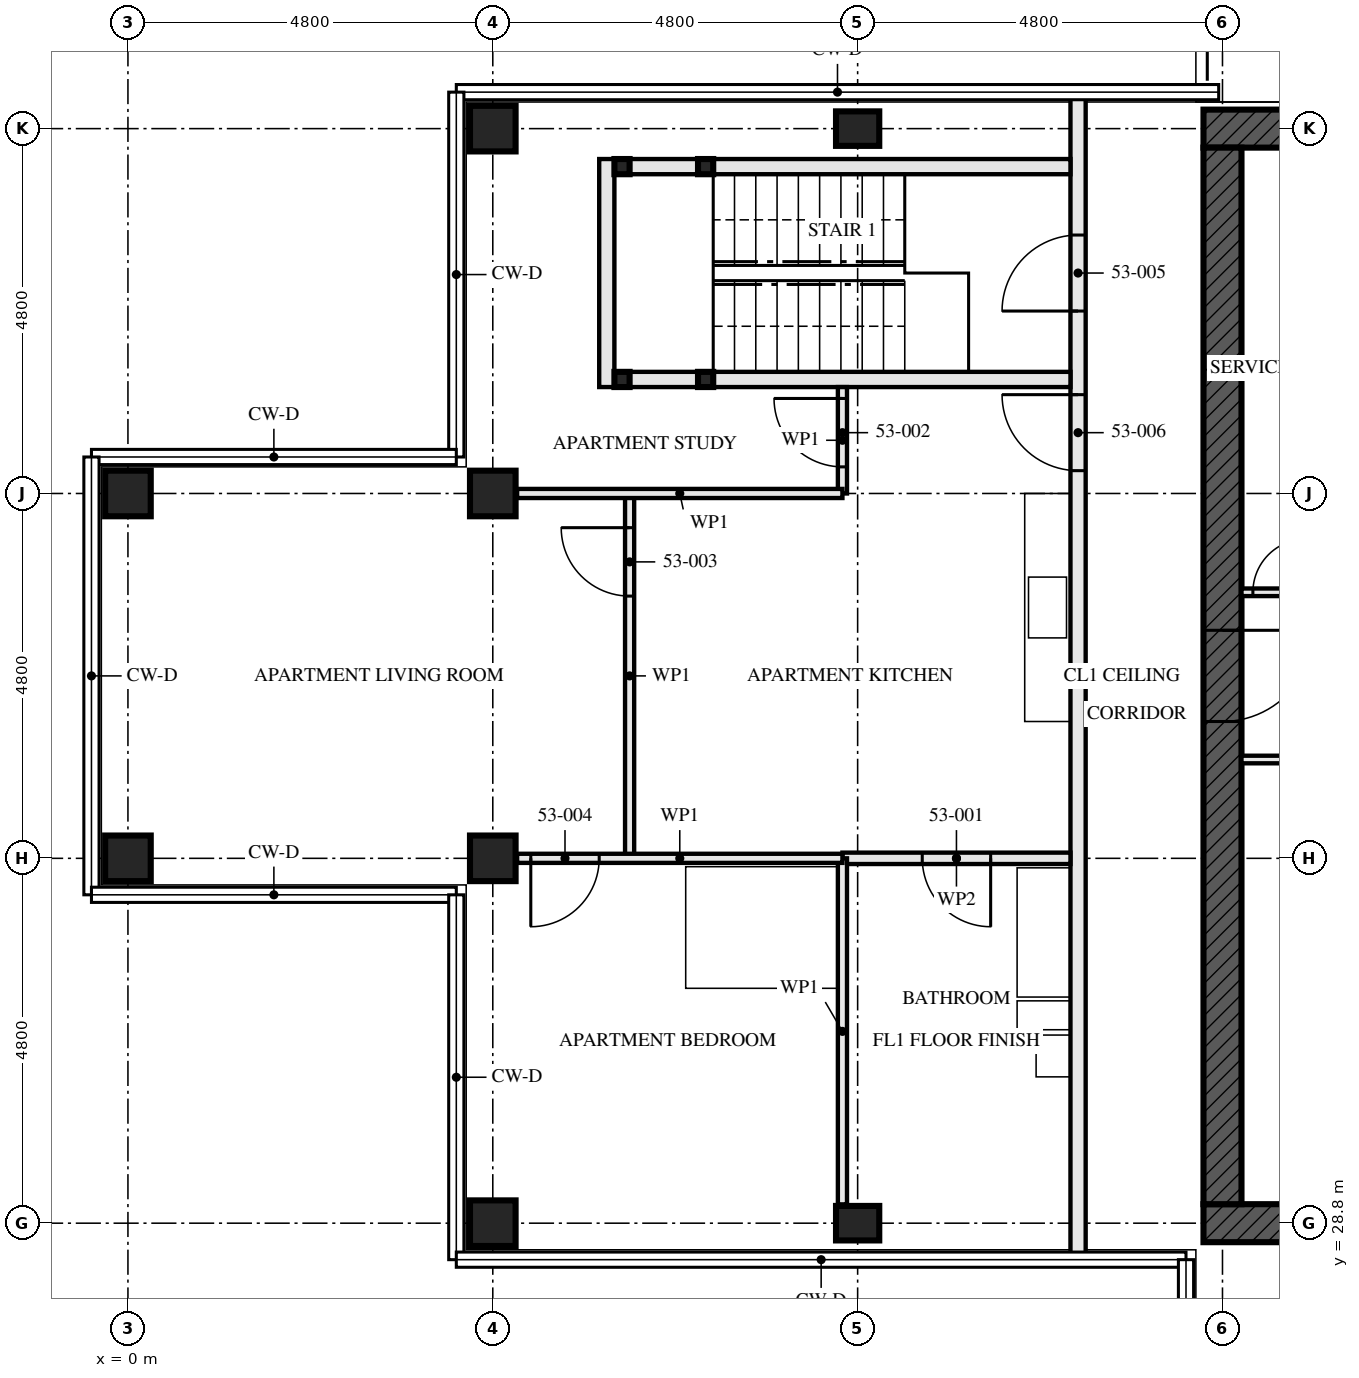
"""IFC4 building model, lengths in metres.
Left out: names, types, materials, properties, quantities, classifications, styles, units other than length and angle.
Written with IfcOpenShell. Run it as: python <this file> out.ifc"""

import sys

from ifc_helpers import new_model, si_unit, direction, frame, frame_2d, origin, origin_2d, place, context, subcontext, project, spatial, rectangle, hollow_rectangle, i_section, extrude, element, fill, save


model = new_model("IFC4")
c1 = context("Model", 3, precision=1e-05, world=origin(), true_north=direction((0.0, 1.0)))
c2 = subcontext(c1, "Body", "Model", "MODEL_VIEW")
j1 = project(units=[si_unit("LENGTHUNIT", "METRE"), si_unit("PLANEANGLEUNIT", "RADIAN")], contexts=[c1])
p1 = place(None, origin())
s1 = spatial("IfcSite", under=j1, at=p1, CompositionType="ELEMENT")
p2 = place(p1, origin())
s2 = spatial("IfcBuilding", under=s1, at=p2, CompositionType="ELEMENT")
p3 = place(p2, frame((0.0, 0.0, 194.5)))
s3 = spatial("IfcBuildingStorey", under=s2, at=p3, CompositionType="ELEMENT", Elevation=194.5)
for number, where, z_axis, x_axis in (
    (1, (0.0, 33.6, 0.0), (0.0, 0.0, 1.0), (0.0, 1.0, 0.0)),
    (2, (0.0, 38.4, 0.0), (0.0, 0.0, 1.0), (0.0, 1.0, 0.0)),
    (3, (4.8, 28.8, 0.0), (0.0, 0.0, 1.0), (0.0, 1.0, 0.0)),
    (4, (4.8, 33.6, 0.0), (0.0, 0.0, 1.0), (0.0, 1.0, 0.0)),
    (5, (4.8, 38.4, 0.0), (0.0, 0.0, 1.0), (0.0, 1.0, 0.0)),
    (6, (4.8, 43.2, 0.0), (0.0, 0.0, 1.0), (0.0, 1.0, 0.0)),
):
    element("IfcColumn", number, at=place(p3, frame(where, z_axis=z_axis, x_axis=x_axis)), inside=s3, PredefinedType="COLUMN", context=c2, shape_type="SweptSolid", body=[
        extrude(hollow_rectangle(XDim=0.6, YDim=0.6, WallThickness=0.05, at=origin_2d()), origin(), (0.0, 0.0, 1.0), 3.5),
    ])
for number, where, z_axis, x_axis in (
    (7, (9.6, 28.8, 0.0), (0.0, 0.0, 1.0), (0.0, 1.0, 0.0)),
    (8, (9.6, 43.2, 0.0), (0.0, 0.0, 1.0), (0.0, 1.0, 0.0)),
):
    element("IfcColumn", number, at=place(p3, frame(where, z_axis=z_axis, x_axis=x_axis)), inside=s3, PredefinedType="COLUMN", context=c2, shape_type="SweptSolid", body=[
        extrude(i_section(OverallWidth=0.454, OverallDepth=0.569, WebThickness=0.078, FlangeThickness=0.125, FilletRadius=0.015, at=origin_2d()), origin(), (0.0, 0.0, 1.0), 3.5),
    ])
p4 = place(p3, frame((14.15, 28.8, -0.17), z_axis=(0.0, 0.0, 1.0), x_axis=(1.0, 0.0, 0.0)))
e9 = element("IfcWall", 9, at=p4, inside=s3, PredefinedType="SHEAR", context=c2, shape_type="SweptSolid", body=[
    extrude(rectangle(XDim=14.9, YDim=0.5, at=frame_2d((7.45, 0.0))), origin(), (0.0, 0.0, 1.0), 3.5),
])
p5 = place(p4, frame((6.85, 0.0, 0.17)))
e10 = element("IfcOpeningElement", 10, at=p5, cuts=e9, PredefinedType="OPENING", context=c2, shape_type="SweptSolid", body=[
    extrude(rectangle(XDim=1.2, YDim=2.1, at=frame_2d((0.6, 1.05))), frame((0.0, 0.26, 0.0), z_axis=(0.0, -1.0, 0.0), x_axis=(1.0, 0.0, 0.0)), (0.0, 0.0, 1.0), 0.521),
])
p6 = place(p3, frame((29.05, 43.2, -0.17), z_axis=(0.0, 0.0, 1.0), x_axis=(-1.0, 0.0, 0.0)))
e11 = element("IfcWall", 11, at=p6, inside=s3, PredefinedType="SHEAR", context=c2, shape_type="SweptSolid", body=[
    extrude(rectangle(XDim=14.9, YDim=0.5, at=frame_2d((7.45, 0.0))), origin(), (0.0, 0.0, 1.0), 3.5),
])
p7 = place(p6, frame((6.95, 0.0, 0.17)))
e12 = element("IfcOpeningElement", 12, at=p7, cuts=e11, PredefinedType="OPENING", context=c2, shape_type="SweptSolid", body=[
    extrude(rectangle(XDim=1.0, YDim=2.4, at=frame_2d((0.5, 1.2))), frame((0.0, 0.26, 0.0), z_axis=(0.0, -1.0, 0.0), x_axis=(1.0, 0.0, 0.0)), (0.0, 0.0, 1.0), 0.521),
])
p8 = place(p3, frame((14.4, 42.95, -0.17), z_axis=(0.0, 0.0, 1.0), x_axis=(0.0, -1.0, 0.0)))
e13 = element("IfcWall", 13, at=p8, inside=s3, PredefinedType="SHEAR", context=c2, shape_type="SweptSolid", body=[
    extrude(rectangle(XDim=13.9, YDim=0.5, at=frame_2d((6.95, 0.0))), origin(), (0.0, 0.0, 1.0), 3.5),
])
p9 = place(p8, frame((6.35, 0.0, 0.17)))
e14 = element("IfcOpeningElement", 14, at=p9, cuts=e13, PredefinedType="OPENING", context=c2, shape_type="SweptSolid", body=[
    extrude(rectangle(XDim=1.2, YDim=2.1, at=frame_2d((0.6, 1.05))), frame((0.0, 0.26, 0.0), z_axis=(0.0, -1.0, 0.0), x_axis=(1.0, 0.0, 0.0)), (0.0, 0.0, 1.0), 0.521),
])
for number, where, z_axis, x_axis in (
    (15, (6.5, 42.7, 0.0), (0.0, 0.0, 1.0), (1.0, 0.0, 0.0)),
    (16, (6.5, 39.9, 0.0), (0.0, 0.0, 1.0), (1.0, 0.0, 0.0)),
    (17, (7.6, 42.7, 0.0), (0.0, 0.0, 1.0), (1.0, 0.0, 0.0)),
    (18, (7.6, 39.9, 0.0), (0.0, 0.0, 1.0), (1.0, 0.0, 0.0)),
):
    element("IfcColumn", number, at=place(p3, frame(where, z_axis=z_axis, x_axis=x_axis)), inside=s3, PredefinedType="COLUMN", context=c2, shape_type="SweptSolid", body=[
        extrude(hollow_rectangle(XDim=0.2, YDim=0.2, WallThickness=0.008, at=origin_2d()), origin(), (0.0, 0.0, 1.0), 3.33),
    ])
p10 = place(p3, frame((6.6, 42.7, 0.0), z_axis=(0.0, 0.0, 1.0), x_axis=(1.0, 0.0, 0.0)))
e19 = element("IfcWall", 19, at=p10, inside=s3, PredefinedType="SOLIDWALL", context=c2, shape_type="SweptSolid", body=[
    extrude(rectangle(XDim=0.9, YDim=0.2, at=frame_2d((0.45, 0.0))), origin(), (0.0, 0.0, 1.0), 2.99),
])
p11 = place(p3, frame((7.7, 42.7, 0.0), z_axis=(0.0, 0.0, 1.0), x_axis=(1.0, 0.0, 0.0)))
e20 = element("IfcWall", 20, at=p11, inside=s3, PredefinedType="SOLIDWALL", context=c2, shape_type="SweptSolid", body=[
    extrude(rectangle(XDim=4.7, YDim=0.2, at=frame_2d((2.35, 0.0))), origin(), (0.0, 0.0, 1.0), 2.99),
])
p12 = place(p3, frame((6.6, 39.9, 0.0), z_axis=(0.0, 0.0, 1.0), x_axis=(1.0, 0.0, 0.0)))
e21 = element("IfcWall", 21, at=p12, inside=s3, PredefinedType="SOLIDWALL", context=c2, shape_type="SweptSolid", body=[
    extrude(rectangle(XDim=0.9, YDim=0.2, at=frame_2d((0.45, 0.0))), origin(), (0.0, 0.0, 1.0), 2.99),
])
p13 = place(p3, frame((7.7, 39.9, 0.0), z_axis=(0.0, 0.0, 1.0), x_axis=(1.0, 0.0, 0.0)))
e22 = element("IfcWall", 22, at=p13, inside=s3, PredefinedType="SOLIDWALL", context=c2, shape_type="SweptSolid", body=[
    extrude(rectangle(XDim=4.7, YDim=0.2, at=frame_2d((2.35, 0.0))), origin(), (0.0, 0.0, 1.0), 2.99),
])
p14 = place(p3, frame((6.3, 42.8, 0.0), z_axis=(0.0, 0.0, 1.0), x_axis=(0.0, -1.0, 0.0)))
e23 = element("IfcWall", 23, at=p14, inside=s3, PredefinedType="SOLIDWALL", context=c2, shape_type="SweptSolid", body=[
    extrude(rectangle(XDim=3.0, YDim=0.2, at=frame_2d((1.5, 0.0))), origin(), (0.0, 0.0, 1.0), 3.33),
])
p15 = place(p3, frame((9.4, 33.6, 0.0), z_axis=(0.0, 0.0, 1.0), x_axis=(1.0, 0.0, 0.0)))
e24 = element("IfcWall", 24, at=p15, inside=s3, PredefinedType="PARTITIONING", context=c2, shape_type="SweptSolid", body=[
    extrude(rectangle(XDim=3.0, YDim=0.15, at=frame_2d((1.5, 0.0))), origin(), (0.0, 0.0, 1.0), 2.55),
])
p16 = place(p15, frame((1.05, 0.0, 0.0)))
e25 = element("IfcOpeningElement", 25, at=p16, cuts=e24, PredefinedType="OPENING", context=c2, shape_type="SweptSolid", body=[
    extrude(rectangle(XDim=0.9, YDim=2.1, at=frame_2d((0.45, 1.05))), frame((0.0, 0.085, 0.0), z_axis=(0.0, -1.0, 0.0), x_axis=(1.0, 0.0, 0.0)), (0.0, 0.0, 1.0), 0.171),
])
p17 = place(p3, frame((9.4, 39.8, 0.0), z_axis=(0.0, 0.0, 1.0), x_axis=(0.0, -1.0, 0.0)))
e26 = element("IfcWall", 26, at=p17, inside=s3, PredefinedType="PARTITIONING", context=c2, shape_type="SweptSolid", body=[
    extrude(rectangle(XDim=1.4, YDim=0.12, at=frame_2d((0.7, 0.0))), origin(), (0.0, 0.0, 1.0), 3.33),
])
p18 = place(p17, frame((0.15, 0.0, 0.0)))
e27 = element("IfcOpeningElement", 27, at=p18, cuts=e26, PredefinedType="OPENING", context=c2, shape_type="SweptSolid", body=[
    extrude(rectangle(XDim=0.9, YDim=2.1, at=frame_2d((0.45, 1.05))), frame((0.0, 0.071, 0.0), z_axis=(0.0, -1.0, 0.0), x_axis=(1.0, 0.0, 0.0)), (0.0, 0.0, 1.0), 0.141),
])
p19 = place(p3, frame((6.6, 38.4, 0.0), z_axis=(0.0, 0.0, 1.0), x_axis=(0.0, -1.0, 0.0)))
e28 = element("IfcWall", 28, at=p19, inside=s3, PredefinedType="PARTITIONING", context=c2, shape_type="SweptSolid", body=[
    extrude(rectangle(XDim=4.8, YDim=0.12, at=frame_2d((2.4, 0.0))), origin(), (0.0, 0.0, 1.0), 3.33),
])
p20 = place(p19, frame((0.45, 0.0, 0.0)))
e29 = element("IfcOpeningElement", 29, at=p20, cuts=e28, PredefinedType="OPENING", context=c2, shape_type="SweptSolid", body=[
    extrude(rectangle(XDim=0.9, YDim=2.1, at=frame_2d((0.45, 1.05))), frame((0.0, 0.071, 0.0), z_axis=(0.0, -1.0, 0.0), x_axis=(1.0, 0.0, 0.0)), (0.0, 0.0, 1.0), 0.141),
])
p21 = place(p3, frame((9.4, 33.6, 0.0), z_axis=(0.0, 0.0, 1.0), x_axis=(0.0, -1.0, 0.0)))
e30 = element("IfcWall", 30, at=p21, inside=s3, PredefinedType="PARTITIONING", context=c2, shape_type="SweptSolid", body=[
    extrude(rectangle(XDim=4.553, YDim=0.12, at=frame_2d((2.276, 0.0))), origin(), (0.0, 0.0, 1.0), 3.33),
])
p22 = place(p3, frame((5.12, 38.4, 0.0), z_axis=(0.0, 0.0, 1.0), x_axis=(1.0, 0.0, 0.0)))
e31 = element("IfcWall", 31, at=p22, inside=s3, PredefinedType="PARTITIONING", context=c2, shape_type="SweptSolid", body=[
    extrude(rectangle(XDim=4.28, YDim=0.12, at=frame_2d((2.14, 0.0))), origin(), (0.0, 0.0, 1.0), 2.55),
])
p23 = place(p3, frame((5.12, 33.6, 0.0), z_axis=(0.0, 0.0, 1.0), x_axis=(1.0, 0.0, 0.0)))
e32 = element("IfcWall", 32, at=p23, inside=s3, PredefinedType="PARTITIONING", context=c2, shape_type="SweptSolid", body=[
    extrude(rectangle(XDim=4.28, YDim=0.12, at=frame_2d((2.14, 0.0))), origin(), (0.0, 0.0, 1.0), 2.55),
])
p24 = place(p23, frame((0.18, 0.0, 0.0)))
e33 = element("IfcOpeningElement", 33, at=p24, cuts=e32, PredefinedType="OPENING", context=c2, shape_type="SweptSolid", body=[
    extrude(rectangle(XDim=0.9, YDim=2.1, at=frame_2d((0.45, 1.05))), frame((0.0, 0.071, 0.0), z_axis=(0.0, -1.0, 0.0), x_axis=(1.0, 0.0, 0.0)), (0.0, 0.0, 1.0), 0.141),
])
p25 = place(p3, frame((12.5, 43.655, 0.0), z_axis=(0.0, 0.0, 1.0), x_axis=(0.0, -1.0, 0.0)))
e34 = element("IfcWall", 34, at=p25, inside=s3, PredefinedType="PARTITIONING", context=c2, shape_type="SweptSolid", body=[
    extrude(rectangle(XDim=15.31, YDim=0.2, at=frame_2d((7.655, 0.0))), origin(), (0.0, 0.0, 1.0), 2.32),
])
p26 = place(p25, frame((1.855, 0.0, 0.0)))
e35 = element("IfcOpeningElement", 35, at=p26, cuts=e34, PredefinedType="OPENING", context=c2, shape_type="SweptSolid", body=[
    extrude(rectangle(XDim=1.0, YDim=2.1, at=frame_2d((0.5, 1.05))), frame((0.0, 0.111, 0.0), z_axis=(0.0, -1.0, 0.0), x_axis=(1.0, 0.0, 0.0)), (0.0, 0.0, 1.0), 0.221),
])
p27 = place(p25, frame((3.955, 0.0, 0.0)))
e36 = element("IfcOpeningElement", 36, at=p27, cuts=e34, PredefinedType="OPENING", context=c2, shape_type="SweptSolid", body=[
    extrude(rectangle(XDim=1.0, YDim=2.1, at=frame_2d((0.5, 1.05))), frame((0.0, 0.111, 0.0), z_axis=(0.0, -1.0, 0.0), x_axis=(1.0, 0.0, 0.0)), (0.0, 0.0, 1.0), 0.221),
])
p28 = place(p3, frame((14.65, 34.9, 0.0), z_axis=(0.0, 0.0, 1.0), x_axis=(1.0, 0.0, 0.0)))
e37 = element("IfcWall", 37, at=p28, inside=s3, PredefinedType="SOLIDWALL", context=c2, shape_type="SweptSolid", body=[
    extrude(rectangle(XDim=5.9, YDim=0.1, at=frame_2d((2.95, 0.0))), origin(), (0.0, 0.0, 1.0), 3.33),
])
p29 = place(p28, frame((1.6, 0.0, 0.0)))
e38 = element("IfcOpeningElement", 38, at=p29, cuts=e37, PredefinedType="OPENING", context=c2, shape_type="SweptSolid", body=[
    extrude(rectangle(XDim=0.7, YDim=2.1, at=frame_2d((0.35, 1.05))), frame((0.0, 0.061, 0.0), z_axis=(0.0, -1.0, 0.0), x_axis=(1.0, 0.0, 0.0)), (0.0, 0.0, 1.0), 0.121),
])
p30 = place(p3, frame((14.65, 37.1, 0.0), z_axis=(0.0, 0.0, 1.0), x_axis=(1.0, 0.0, 0.0)))
e39 = element("IfcWall", 39, at=p30, inside=s3, PredefinedType="SOLIDWALL", context=c2, shape_type="SweptSolid", body=[
    extrude(rectangle(XDim=5.9, YDim=0.1, at=frame_2d((2.95, 0.0))), origin(), (0.0, 0.0, 1.0), 3.33),
])
p31 = place(p30, frame((0.15, 0.0, 0.0)))
e40 = element("IfcOpeningElement", 40, at=p31, cuts=e39, PredefinedType="OPENING", context=c2, shape_type="SweptSolid", body=[
    extrude(rectangle(XDim=0.7, YDim=2.1, at=frame_2d((0.35, 1.05))), frame((0.0, 0.061, 0.0), z_axis=(0.0, -1.0, 0.0), x_axis=(1.0, 0.0, 0.0)), (0.0, 0.0, 1.0), 0.121),
])
p32 = place(p30, frame((1.5, 0.0, 0.0)))
e41 = element("IfcOpeningElement", 41, at=p32, cuts=e39, PredefinedType="OPENING", context=c2, shape_type="SweptSolid", body=[
    extrude(rectangle(XDim=0.9, YDim=2.1, at=frame_2d((0.45, 1.05))), frame((0.0, 0.061, 0.0), z_axis=(0.0, -1.0, 0.0), x_axis=(1.0, 0.0, 0.0)), (0.0, 0.0, 1.0), 0.121),
])
p33 = place(p16, frame((0.9, 0.0, 0.0), z_axis=(0.0, 0.0, 1.0), x_axis=(-1.0, 0.0, 0.0)))
e42 = element("IfcDoor", 42, at=p33, inside=s3, OperationType="SINGLE_SWING_RIGHT", PredefinedType="DOOR", context=c2, shape_type="SweptSolid", body=[
    extrude(rectangle(XDim=0.9, YDim=2.1, at=frame_2d((0.45, 1.05))), frame((0.0, 0.022, 0.0), z_axis=(0.0, -1.0, 0.0), x_axis=(1.0, 0.0, 0.0)), (0.0, 0.0, 1.0), 0.044),
])
fill(e25, e42)
p34 = place(p18, frame((0.9, 0.0, 0.0), z_axis=(0.0, 0.0, 1.0), x_axis=(-1.0, 0.0, 0.0)))
e43 = element("IfcDoor", 43, at=p34, inside=s3, OperationType="SINGLE_SWING_LEFT", PredefinedType="DOOR", context=c2, shape_type="SweptSolid", body=[
    extrude(rectangle(XDim=0.9, YDim=2.1, at=frame_2d((0.45, 1.05))), frame((0.0, 0.022, 0.0), z_axis=(0.0, -1.0, 0.0), x_axis=(1.0, 0.0, 0.0)), (0.0, 0.0, 1.0), 0.044),
])
fill(e27, e43)
p35 = place(p20, frame((0.9, 0.0, 0.0), z_axis=(0.0, 0.0, 1.0), x_axis=(-1.0, 0.0, 0.0)))
e44 = element("IfcDoor", 44, at=p35, inside=s3, OperationType="SINGLE_SWING_LEFT", PredefinedType="DOOR", context=c2, shape_type="SweptSolid", body=[
    extrude(rectangle(XDim=0.9, YDim=2.1, at=frame_2d((0.45, 1.05))), frame((0.0, 0.022, 0.0), z_axis=(0.0, -1.0, 0.0), x_axis=(1.0, 0.0, 0.0)), (0.0, 0.0, 1.0), 0.044),
])
fill(e29, e44)
p36 = place(p24, frame((0.9, 0.0, 0.0), z_axis=(0.0, 0.0, 1.0), x_axis=(-1.0, 0.0, 0.0)))
e45 = element("IfcDoor", 45, at=p36, inside=s3, OperationType="SINGLE_SWING_LEFT", PredefinedType="DOOR", context=c2, shape_type="SweptSolid", body=[
    extrude(rectangle(XDim=0.9, YDim=2.1, at=frame_2d((0.45, 1.05))), frame((0.0, 0.022, 0.0), z_axis=(0.0, -1.0, 0.0), x_axis=(1.0, 0.0, 0.0)), (0.0, 0.0, 1.0), 0.044),
])
fill(e33, e45)
p37 = place(p26, frame((1.0, 0.0, 0.0), z_axis=(0.0, 0.0, 1.0), x_axis=(-1.0, 0.0, 0.0)))
e46 = element("IfcDoor", 46, at=p37, inside=s3, OperationType="SINGLE_SWING_RIGHT", PredefinedType="DOOR", context=c2, shape_type="SweptSolid", body=[
    extrude(rectangle(XDim=1.0, YDim=2.1, at=frame_2d((0.5, 1.05))), frame((0.0, 0.032, 0.0), z_axis=(0.0, -1.0, 0.0), x_axis=(1.0, 0.0, 0.0)), (0.0, 0.0, 1.0), 0.064),
])
fill(e35, e46)
p38 = place(p27, frame((1.0, 0.0, 0.0), z_axis=(0.0, 0.0, 1.0), x_axis=(-1.0, 0.0, 0.0)))
e47 = element("IfcDoor", 47, at=p38, inside=s3, OperationType="SINGLE_SWING_LEFT", PredefinedType="DOOR", context=c2, shape_type="SweptSolid", body=[
    extrude(rectangle(XDim=1.0, YDim=2.1, at=frame_2d((0.5, 1.05))), frame((0.0, 0.027, 0.0), z_axis=(0.0, -1.0, 0.0), x_axis=(1.0, 0.0, 0.0)), (0.0, 0.0, 1.0), 0.054),
])
fill(e36, e47)
p39 = place(p31, origin())
e48 = element("IfcDoor", 48, at=p39, inside=s3, OperationType="SINGLE_SWING_LEFT", PredefinedType="DOOR", context=c2, shape_type="SweptSolid", body=[
    extrude(rectangle(XDim=0.7, YDim=2.1, at=frame_2d((0.35, 1.05))), frame((0.0, 0.027, 0.0), z_axis=(0.0, -1.0, 0.0), x_axis=(1.0, 0.0, 0.0)), (0.0, 0.0, 1.0), 0.054),
])
fill(e40, e48)
p40 = place(p9, origin())
e49 = element("IfcDoor", 49, at=p40, inside=s3, OperationType="SINGLE_SWING_LEFT", PredefinedType="DOOR", context=c2, shape_type="SweptSolid", body=[
    extrude(rectangle(XDim=1.2, YDim=2.1, at=frame_2d((0.6, 1.05))), frame((0.0, 0.027, 0.0), z_axis=(0.0, -1.0, 0.0), x_axis=(1.0, 0.0, 0.0)), (0.0, 0.0, 1.0), 0.054),
])
fill(e14, e49)
save(model, sys.argv[1])
